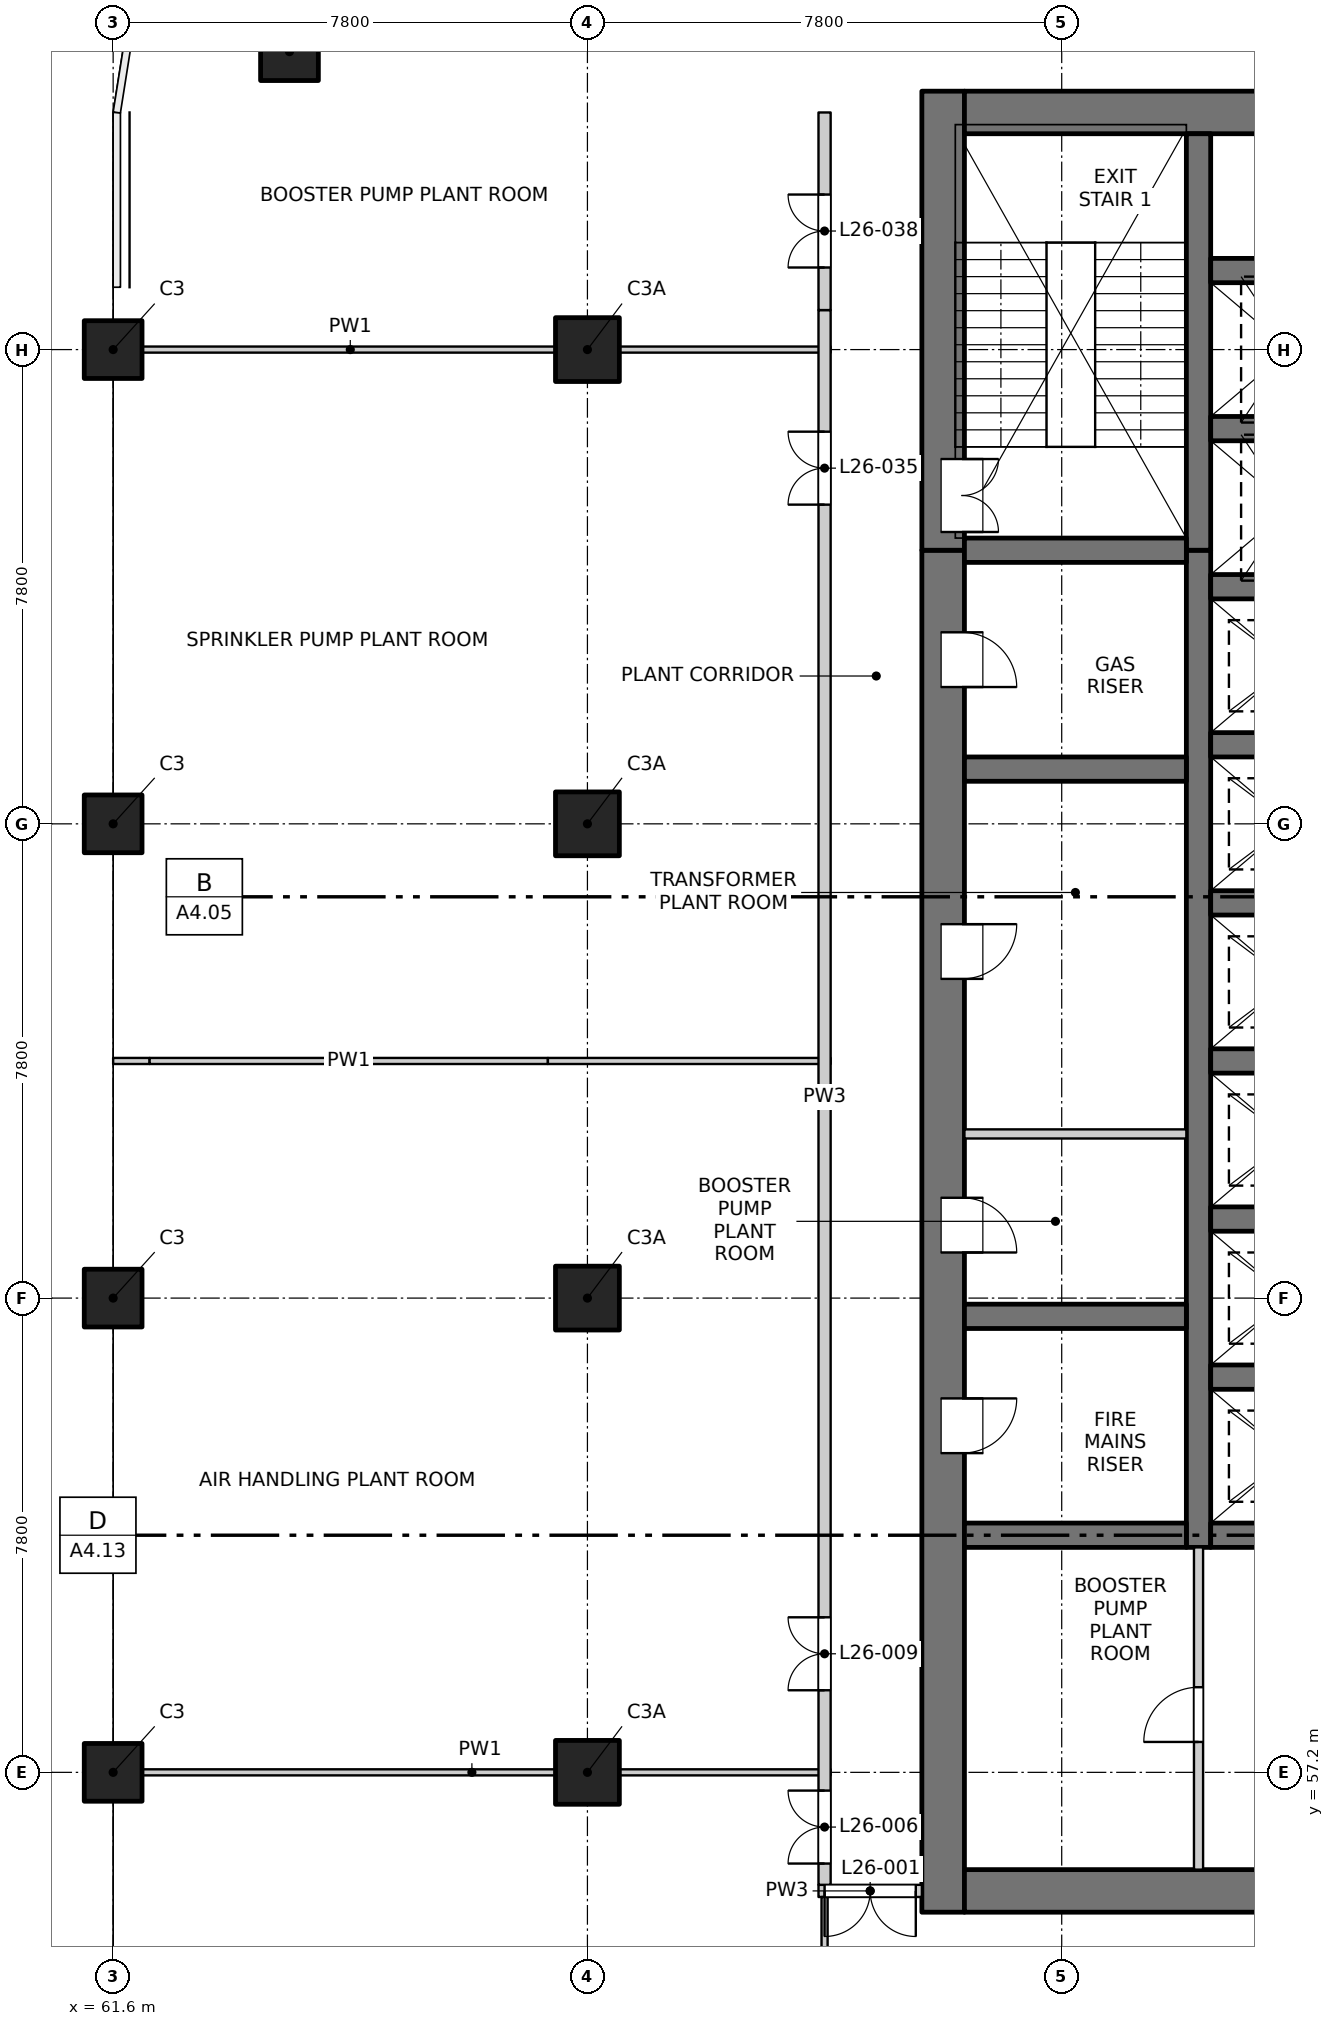
"""IFC4 building model, lengths in metres.
Left out: names, types, materials, properties, quantities, classifications, styles, units other than length and angle.
Written with IfcOpenShell. Run it as: python <this file> out.ifc"""

import sys

from ifc_helpers import new_model, si_unit, direction, frame, frame_2d, origin, origin_2d, place, context, subcontext, project, spatial, rectangle, extrude, element, fill, save


model = new_model("IFC4")
c1 = context("Model", 3, precision=1e-05, world=origin(), true_north=direction((0.0, 1.0)))
c2 = subcontext(c1, "Body", "Model", "MODEL_VIEW")
j1 = project(units=[si_unit("LENGTHUNIT", "METRE"), si_unit("PLANEANGLEUNIT", "RADIAN")], contexts=[c1])
p1 = place(None, origin())
s1 = spatial("IfcSite", under=j1, at=p1, CompositionType="ELEMENT")
p2 = place(p1, origin())
s2 = spatial("IfcBuilding", under=s1, at=p2, CompositionType="ELEMENT")
p3 = place(p2, frame((0.0, 0.0, 95.4)))
s3 = spatial("IfcBuildingStorey", under=s2, at=p3, CompositionType="ELEMENT", Elevation=95.4)
for number, where, z_axis, x_axis in (
    (1, (64.5, 85.5, -0.3), (0.0, 0.0, 1.0), (1.0, 0.0, 0.0)),
    (2, (61.6, 57.2, -0.3), (0.0, 0.0, 1.0), (1.0, 0.0, 0.0)),
    (3, (61.6, 65.0, -0.3), (0.0, 0.0, 1.0), (1.0, 0.0, 0.0)),
    (4, (61.6, 72.8, -0.3), (0.0, 0.0, 1.0), (1.0, 0.0, 0.0)),
    (5, (61.6, 80.6, -0.3), (0.0, 0.0, 1.0), (1.0, 0.0, 0.0)),
):
    element("IfcColumn", number, at=place(p3, frame(where, z_axis=z_axis, x_axis=x_axis)), inside=s3, PredefinedType="COLUMN", context=c2, shape_type="SweptSolid", body=[
        extrude(rectangle(XDim=0.95, YDim=0.95, at=origin_2d()), origin(), (0.0, 0.0, 1.0), 2.9),
    ])
for number, where, z_axis, x_axis in (
    (6, (69.4, 57.2, -0.3), (0.0, 0.0, 1.0), (1.0, 0.0, 0.0)),
    (7, (69.4, 65.0, -0.3), (0.0, 0.0, 1.0), (1.0, 0.0, 0.0)),
    (8, (69.4, 72.8, -0.3), (0.0, 0.0, 1.0), (1.0, 0.0, 0.0)),
    (9, (69.4, 80.6, -0.3), (0.0, 0.0, 1.0), (1.0, 0.0, 0.0)),
):
    element("IfcColumn", number, at=place(p3, frame(where, z_axis=z_axis, x_axis=x_axis)), inside=s3, PredefinedType="COLUMN", context=c2, shape_type="SweptSolid", body=[
        extrude(rectangle(XDim=1.05, YDim=1.05, at=origin_2d()), origin(), (0.0, 0.0, 1.0), 2.9),
    ])
p4 = place(p3, frame((75.25, 54.9, -0.3), z_axis=(0.0, 0.0, 1.0), x_axis=(0.0, 1.0, 0.0)))
e10 = element("IfcWall", 10, at=p4, inside=s3, PredefinedType="SOLIDWALL", context=c2, shape_type="SweptSolid", body=[
    extrude(rectangle(XDim=22.4, YDim=0.7, at=frame_2d((11.2, 0.0))), origin(), (0.0, 0.0, 1.0), 4.5),
])
p5 = place(p4, frame((7.55, 0.0, 0.3)))
e11 = element("IfcOpeningElement", 11, at=p5, cuts=e10, PredefinedType="OPENING", context=c2, shape_type="SweptSolid", body=[
    extrude(rectangle(XDim=0.9, YDim=2.1, at=frame_2d((0.45, 1.05))), frame((0.0, 0.36, 0.0), z_axis=(0.0, -1.0, 0.0), x_axis=(1.0, 0.0, 0.0)), (0.0, 0.0, 1.0), 0.72),
])
p6 = place(p4, frame((10.85, 0.0, 0.3)))
e12 = element("IfcOpeningElement", 12, at=p6, cuts=e10, PredefinedType="OPENING", context=c2, shape_type="SweptSolid", body=[
    extrude(rectangle(XDim=0.9, YDim=2.1, at=frame_2d((0.45, 1.05))), frame((0.0, 0.36, 0.0), z_axis=(0.0, -1.0, 0.0), x_axis=(1.0, 0.0, 0.0)), (0.0, 0.0, 1.0), 0.72),
])
p7 = place(p4, frame((15.35, 0.0, 0.3)))
e13 = element("IfcOpeningElement", 13, at=p7, cuts=e10, PredefinedType="OPENING", context=c2, shape_type="SweptSolid", body=[
    extrude(rectangle(XDim=0.9, YDim=2.1, at=frame_2d((0.45, 1.05))), frame((0.0, 0.36, 0.0), z_axis=(0.0, -1.0, 0.0), x_axis=(1.0, 0.0, 0.0)), (0.0, 0.0, 1.0), 0.72),
])
p8 = place(p4, frame((20.15, 0.0, 0.3)))
e14 = element("IfcOpeningElement", 14, at=p8, cuts=e10, PredefinedType="OPENING", context=c2, shape_type="SweptSolid", body=[
    extrude(rectangle(XDim=0.9, YDim=2.1, at=frame_2d((0.45, 1.05))), frame((0.0, 0.36, 0.0), z_axis=(0.0, -1.0, 0.0), x_axis=(1.0, 0.0, 0.0)), (0.0, 0.0, 1.0), 0.72),
])
p9 = place(p3, frame((75.25, 77.3, -0.3), z_axis=(0.0, 0.0, 1.0), x_axis=(0.0, 1.0, 0.0)))
e15 = element("IfcWall", 15, at=p9, inside=s3, PredefinedType="SOLIDWALL", context=c2, shape_type="SweptSolid", body=[
    extrude(rectangle(XDim=7.55, YDim=0.7, at=frame_2d((3.775, 0.0))), origin(), (0.0, 0.0, 1.0), 4.5),
])
p10 = place(p9, frame((0.3, 0.0, 0.3)))
e16 = element("IfcOpeningElement", 16, at=p10, cuts=e15, PredefinedType="OPENING", context=c2, shape_type="SweptSolid", body=[
    extrude(rectangle(XDim=1.2, YDim=2.1, at=frame_2d((0.6, 1.05))), frame((0.0, 0.36, 0.0), z_axis=(0.0, -1.0, 0.0), x_axis=(1.0, 0.0, 0.0)), (0.0, 0.0, 1.0), 0.72),
])
p11 = place(p3, frame((75.6, 55.25, -0.3), z_axis=(0.0, 0.0, 1.0), x_axis=(1.0, 0.0, 0.0)))
e17 = element("IfcWall", 17, at=p11, inside=s3, PredefinedType="SOLIDWALL", context=c2, shape_type="SweptSolid", body=[
    extrude(rectangle(XDim=18.8, YDim=0.7, at=frame_2d((9.4, 0.0))), origin(), (0.0, 0.0, 1.0), 4.5),
])
p12 = place(p11, frame((7.15, 0.0, 0.3)))
e18 = element("IfcOpeningElement", 18, at=p12, cuts=e17, PredefinedType="OPENING", context=c2, shape_type="SweptSolid", body=[
    extrude(rectangle(XDim=1.5, YDim=2.1, at=frame_2d((0.75, 1.05))), frame((0.0, 0.36, 0.0), z_axis=(0.0, -1.0, 0.0), x_axis=(1.0, 0.0, 0.0)), (0.0, 0.0, 1.0), 0.72),
])
p13 = place(p3, frame((75.6, 84.5, -0.3), z_axis=(0.0, 0.0, 1.0), x_axis=(1.0, 0.0, 0.0)))
e19 = element("IfcWall", 19, at=p13, inside=s3, PredefinedType="SOLIDWALL", context=c2, shape_type="SweptSolid", body=[
    extrude(rectangle(XDim=18.8, YDim=0.7, at=frame_2d((9.4, 0.0))), origin(), (0.0, 0.0, 1.0), 4.5),
])
p14 = place(p3, frame((79.45, 60.9, -0.3), z_axis=(0.0, 0.0, 1.0), x_axis=(0.0, 1.0, 0.0)))
e20 = element("IfcWall", 20, at=p14, inside=s3, PredefinedType="SOLIDWALL", context=c2, shape_type="SweptSolid", body=[
    extrude(rectangle(XDim=16.4, YDim=0.4, at=frame_2d((8.2, 0.0))), origin(), (0.0, 0.0, 1.0), 4.5),
])
p15 = place(p3, frame((79.45, 77.3, -0.3), z_axis=(0.0, 0.0, 1.0), x_axis=(0.0, 1.0, 0.0)))
e21 = element("IfcWall", 21, at=p15, inside=s3, PredefinedType="SOLIDWALL", context=c2, shape_type="SweptSolid", body=[
    extrude(rectangle(XDim=6.85, YDim=0.4, at=frame_2d((3.425, 0.0))), origin(), (0.0, 0.0, 1.0), 4.5),
])
for number, where, z_axis, x_axis in (
    (22, (79.65, 61.1, -0.3), (0.0, 0.0, 1.0), (1.0, 0.0, 0.0)),
    (23, (79.65, 63.7, -0.3), (0.0, 0.0, 1.0), (1.0, 0.0, 0.0)),
    (24, (79.65, 66.3, -0.3), (0.0, 0.0, 1.0), (1.0, 0.0, 0.0)),
    (25, (79.65, 68.9, -0.3), (0.0, 0.0, 1.0), (1.0, 0.0, 0.0)),
    (26, (79.65, 71.5, -0.3), (0.0, 0.0, 1.0), (1.0, 0.0, 0.0)),
    (27, (79.65, 74.1, -0.3), (0.0, 0.0, 1.0), (1.0, 0.0, 0.0)),
    (28, (79.65, 76.7, -0.3), (0.0, 0.0, 1.0), (1.0, 0.0, 0.0)),
    (29, (79.65, 79.3, -0.3), (0.0, 0.0, 1.0), (1.0, 0.0, 0.0)),
    (30, (79.65, 81.9, -0.3), (0.0, 0.0, 1.0), (1.0, 0.0, 0.0)),
):
    element("IfcWall", number, at=place(p3, frame(where, z_axis=z_axis, x_axis=x_axis)), inside=s3, PredefinedType="SOLIDWALL", context=c2, shape_type="SweptSolid", body=[
        extrude(rectangle(XDim=3.0, YDim=0.4, at=frame_2d((1.5, 0.0))), origin(), (0.0, 0.0, 1.0), 4.5),
    ])
for number, where, z_axis, x_axis in (
    (31, (75.6, 61.1, -0.3), (0.0, 0.0, 1.0), (1.0, 0.0, 0.0)),
    (32, (75.6, 64.7, -0.3), (0.0, 0.0, 1.0), (1.0, 0.0, 0.0)),
    (33, (75.6, 73.7, -0.3), (0.0, 0.0, 1.0), (1.0, 0.0, 0.0)),
    (34, (75.6, 77.3, -0.3), (0.0, 0.0, 1.0), (1.0, 0.0, 0.0)),
):
    element("IfcWall", number, at=place(p3, frame(where, z_axis=z_axis, x_axis=x_axis)), inside=s3, PredefinedType="SOLIDWALL", context=c2, shape_type="SweptSolid", body=[
        extrude(rectangle(XDim=3.65, YDim=0.4, at=frame_2d((1.825, 0.0))), origin(), (0.0, 0.0, 1.0), 4.5),
    ])
p16 = place(p3, frame((73.2, 55.25, 0.0), z_axis=(0.0, 0.0, 1.0), x_axis=(1.0, 0.0, 0.0)))
e35 = element("IfcWall", 35, at=p16, inside=s3, PredefinedType="PARTITIONING", context=c2, shape_type="SweptSolid", body=[
    extrude(rectangle(XDim=1.7, YDim=0.2, at=frame_2d((0.85, 0.0))), origin(), (0.0, 0.0, 1.0), 4.2),
])
p17 = place(p16, frame((0.1, 0.0, 0.0)))
e36 = element("IfcOpeningElement", 36, at=p17, cuts=e35, PredefinedType="OPENING", context=c2, shape_type="SweptSolid", body=[
    extrude(rectangle(XDim=1.5, YDim=2.1, at=frame_2d((0.75, 1.05))), frame((0.0, 0.11, 0.0), z_axis=(0.0, -1.0, 0.0), x_axis=(1.0, 0.0, 0.0)), (0.0, 0.0, 1.0), 0.22),
])
p18 = place(p3, frame((61.6, 57.2, 0.0), z_axis=(0.0, 0.0, 1.0), x_axis=(1.0, 0.0, 0.0)))
e37 = element("IfcWall", 37, at=p18, inside=s3, PredefinedType="PARTITIONING", context=c2, shape_type="SweptSolid", body=[
    extrude(rectangle(XDim=11.8, YDim=0.1, at=frame_2d((5.9, 0.0))), origin(), (0.0, 0.0, 1.0), 4.2),
])
p19 = place(p3, frame((75.6, 67.7, 0.0), z_axis=(0.0, 0.0, 1.0), x_axis=(1.0, 0.0, 0.0)))
e38 = element("IfcWall", 38, at=p19, inside=s3, PredefinedType="PARTITIONING", context=c2, shape_type="SweptSolid", body=[
    extrude(rectangle(XDim=3.65, YDim=0.15, at=frame_2d((1.825, 0.0))), origin(), (0.0, 0.0, 1.0), 4.2),
])
p20 = place(p3, frame((61.6, 68.9, 0.0), z_axis=(0.0, 0.0, 1.0), x_axis=(1.0, 0.0, 0.0)))
e39 = element("IfcWall", 39, at=p20, inside=s3, PredefinedType="PARTITIONING", context=c2, shape_type="SweptSolid", body=[
    extrude(rectangle(XDim=0.6, YDim=0.1, at=frame_2d((0.3, 0.0))), origin(), (0.0, 0.0, 1.0), 4.2),
])
p21 = place(p3, frame((62.2, 68.9, 0.0), z_axis=(0.0, 0.0, 1.0), x_axis=(1.0, 0.0, 0.0)))
e40 = element("IfcWall", 40, at=p21, inside=s3, PredefinedType="PARTITIONING", context=c2, shape_type="SweptSolid", body=[
    extrude(rectangle(XDim=6.55, YDim=0.1, at=frame_2d((3.275, 0.0))), origin(), (0.0, 0.0, 1.0), 2.6),
])
p22 = place(p3, frame((68.75, 68.9, 0.0), z_axis=(0.0, 0.0, 1.0), x_axis=(1.0, 0.0, 0.0)))
e41 = element("IfcWall", 41, at=p22, inside=s3, PredefinedType="PARTITIONING", context=c2, shape_type="SweptSolid", body=[
    extrude(rectangle(XDim=4.65, YDim=0.1, at=frame_2d((2.325, 0.0))), origin(), (0.0, 0.0, 1.0), 3.6),
])
p23 = place(p3, frame((61.6, 80.6, 0.0), z_axis=(0.0, 0.0, 1.0), x_axis=(1.0, 0.0, 0.0)))
e42 = element("IfcWall", 42, at=p23, inside=s3, PredefinedType="PARTITIONING", context=c2, shape_type="SweptSolid", body=[
    extrude(rectangle(XDim=7.8, YDim=0.1, at=frame_2d((3.9, 0.0))), origin(), (0.0, 0.0, 1.0), 4.2),
])
p24 = place(p3, frame((69.4, 80.6, 0.0), z_axis=(0.0, 0.0, 1.0), x_axis=(1.0, 0.0, 0.0)))
e43 = element("IfcWall", 43, at=p24, inside=s3, PredefinedType="PARTITIONING", context=c2, shape_type="SweptSolid", body=[
    extrude(rectangle(XDim=4.0, YDim=0.1, at=frame_2d((2.0, 0.0))), origin(), (0.0, 0.0, 1.0), 2.6),
])
p25 = place(p3, frame((73.3, 48.75, 0.0), z_axis=(0.0, 0.0, 1.0), x_axis=(0.0, 1.0, 0.0)))
e44 = element("IfcWall", 44, at=p25, inside=s3, PredefinedType="PARTITIONING", context=c2, shape_type="SweptSolid", body=[
    extrude(rectangle(XDim=6.4, YDim=0.1, at=frame_2d((3.2, 0.0))), origin(), (0.0, 0.0, 1.0), 4.2),
])
p26 = place(p3, frame((73.3, 55.35, 0.0), z_axis=(0.0, 0.0, 1.0), x_axis=(0.0, 1.0, 0.0)))
e45 = element("IfcWall", 45, at=p26, inside=s3, PredefinedType="PARTITIONING", context=c2, shape_type="SweptSolid", body=[
    extrude(rectangle(XDim=25.9, YDim=0.2, at=frame_2d((12.95, 0.0))), origin(), (0.0, 0.0, 1.0), 4.2),
])
p27 = place(p26, frame((0.35, 0.0, 0.0)))
e46 = element("IfcOpeningElement", 46, at=p27, cuts=e45, PredefinedType="OPENING", context=c2, shape_type="SweptSolid", body=[
    extrude(rectangle(XDim=1.2, YDim=2.1, at=frame_2d((0.6, 1.05))), frame((0.0, 0.11, 0.0), z_axis=(0.0, -1.0, 0.0), x_axis=(1.0, 0.0, 0.0)), (0.0, 0.0, 1.0), 0.22),
])
p28 = place(p26, frame((3.2, 0.0, 0.0)))
e47 = element("IfcOpeningElement", 47, at=p28, cuts=e45, PredefinedType="OPENING", context=c2, shape_type="SweptSolid", body=[
    extrude(rectangle(XDim=1.2, YDim=2.1, at=frame_2d((0.6, 1.05))), frame((0.0, 0.11, 0.0), z_axis=(0.0, -1.0, 0.0), x_axis=(1.0, 0.0, 0.0)), (0.0, 0.0, 1.0), 0.22),
])
p29 = place(p26, frame((22.7, 0.0, 0.0)))
e48 = element("IfcOpeningElement", 48, at=p29, cuts=e45, PredefinedType="OPENING", context=c2, shape_type="SweptSolid", body=[
    extrude(rectangle(XDim=1.2, YDim=2.1, at=frame_2d((0.6, 1.05))), frame((0.0, 0.11, 0.0), z_axis=(0.0, -1.0, 0.0), x_axis=(1.0, 0.0, 0.0)), (0.0, 0.0, 1.0), 0.22),
])
p30 = place(p3, frame((73.3, 81.25, 0.0), z_axis=(0.0, 0.0, 1.0), x_axis=(0.0, 1.0, 0.0)))
e49 = element("IfcWall", 49, at=p30, inside=s3, PredefinedType="PARTITIONING", context=c2, shape_type="SweptSolid", body=[
    extrude(rectangle(XDim=3.25, YDim=0.2, at=frame_2d((1.625, 0.0))), origin(), (0.0, 0.0, 1.0), 2.6),
])
p31 = place(p30, frame((0.7, 0.0, 0.0)))
e50 = element("IfcOpeningElement", 50, at=p31, cuts=e49, PredefinedType="OPENING", context=c2, shape_type="SweptSolid", body=[
    extrude(rectangle(XDim=1.2, YDim=2.1, at=frame_2d((0.6, 1.05))), frame((0.0, 0.11, 0.0), z_axis=(0.0, -1.0, 0.0), x_axis=(1.0, 0.0, 0.0)), (0.0, 0.0, 1.0), 0.22),
])
p32 = place(p3, frame((79.45, 55.6, 0.0), z_axis=(0.0, 0.0, 1.0), x_axis=(0.0, 1.0, 0.0)))
e51 = element("IfcWall", 51, at=p32, inside=s3, PredefinedType="PARTITIONING", context=c2, shape_type="SweptSolid", body=[
    extrude(rectangle(XDim=5.3, YDim=0.15, at=frame_2d((2.65, 0.0))), origin(), (0.0, 0.0, 1.0), 4.2),
])
p33 = place(p32, frame((2.1, 0.0, 0.0)))
e52 = element("IfcOpeningElement", 52, at=p33, cuts=e51, PredefinedType="OPENING", context=c2, shape_type="SweptSolid", body=[
    extrude(rectangle(XDim=0.9, YDim=2.1, at=frame_2d((0.45, 1.05))), frame((0.0, 0.085, 0.0), z_axis=(0.0, -1.0, 0.0), x_axis=(1.0, 0.0, 0.0)), (0.0, 0.0, 1.0), 0.17),
])
p34 = place(p17, origin())
e53 = element("IfcDoor", 53, at=p34, inside=s3, OperationType="DOUBLE_DOOR_SINGLE_SWING", PredefinedType="DOOR", context=c2, shape_type="SweptSolid", body=[
    extrude(rectangle(XDim=1.5, YDim=2.1, at=frame_2d((0.75, 1.05))), frame((0.0, 0.025, 0.0), z_axis=(0.0, -1.0, 0.0), x_axis=(1.0, 0.0, 0.0)), (0.0, 0.0, 1.0), 0.05),
])
fill(e36, e53)
p35 = place(p27, origin())
e54 = element("IfcDoor", 54, at=p35, inside=s3, OperationType="DOUBLE_DOOR_SINGLE_SWING", PredefinedType="DOOR", context=c2, shape_type="SweptSolid", body=[
    extrude(rectangle(XDim=1.2, YDim=2.1, at=frame_2d((0.6, 1.05))), frame((0.0, 0.025, 0.0), z_axis=(0.0, -1.0, 0.0), x_axis=(1.0, 0.0, 0.0)), (0.0, 0.0, 1.0), 0.05),
])
fill(e46, e54)
p36 = place(p33, origin())
e55 = element("IfcDoor", 55, at=p36, inside=s3, OperationType="SINGLE_SWING_LEFT", PredefinedType="DOOR", context=c2, shape_type="SweptSolid", body=[
    extrude(rectangle(XDim=0.9, YDim=2.1, at=frame_2d((0.45, 1.05))), frame((0.0, 0.025, 0.0), z_axis=(0.0, -1.0, 0.0), x_axis=(1.0, 0.0, 0.0)), (0.0, 0.0, 1.0), 0.05),
])
fill(e52, e55)
p37 = place(p28, origin())
e56 = element("IfcDoor", 56, at=p37, inside=s3, OperationType="DOUBLE_DOOR_SINGLE_SWING", PredefinedType="DOOR", context=c2, shape_type="SweptSolid", body=[
    extrude(rectangle(XDim=1.2, YDim=2.1, at=frame_2d((0.6, 1.05))), frame((0.0, 0.025, 0.0), z_axis=(0.0, -1.0, 0.0), x_axis=(1.0, 0.0, 0.0)), (0.0, 0.0, 1.0), 0.05),
])
fill(e47, e56)
p38 = place(p5, origin())
e57 = element("IfcDoor", 57, at=p38, inside=s3, OperationType="SINGLE_SWING_LEFT", PredefinedType="DOOR", context=c2, shape_type="SweptSolid", body=[
    extrude(rectangle(XDim=0.9, YDim=2.1, at=frame_2d((0.45, 1.05))), frame((0.0, -0.285, 0.0), z_axis=(0.0, -1.0, 0.0), x_axis=(1.0, 0.0, 0.0)), (0.0, 0.0, 1.0), 0.05),
])
fill(e11, e57)
p39 = place(p6, origin())
e58 = element("IfcDoor", 58, at=p39, inside=s3, OperationType="SINGLE_SWING_RIGHT", PredefinedType="DOOR", context=c2, shape_type="SweptSolid", body=[
    extrude(rectangle(XDim=0.9, YDim=2.1, at=frame_2d((0.45, 1.05))), frame((0.0, -0.285, 0.0), z_axis=(0.0, -1.0, 0.0), x_axis=(1.0, 0.0, 0.0)), (0.0, 0.0, 1.0), 0.05),
])
fill(e12, e58)
p40 = place(p7, origin())
e59 = element("IfcDoor", 59, at=p40, inside=s3, OperationType="SINGLE_SWING_LEFT", PredefinedType="DOOR", context=c2, shape_type="SweptSolid", body=[
    extrude(rectangle(XDim=0.9, YDim=2.1, at=frame_2d((0.45, 1.05))), frame((0.0, -0.285, 0.0), z_axis=(0.0, -1.0, 0.0), x_axis=(1.0, 0.0, 0.0)), (0.0, 0.0, 1.0), 0.05),
])
fill(e13, e59)
p41 = place(p8, origin())
e60 = element("IfcDoor", 60, at=p41, inside=s3, OperationType="SINGLE_SWING_RIGHT", PredefinedType="DOOR", context=c2, shape_type="SweptSolid", body=[
    extrude(rectangle(XDim=0.9, YDim=2.1, at=frame_2d((0.45, 1.05))), frame((0.0, -0.285, 0.0), z_axis=(0.0, -1.0, 0.0), x_axis=(1.0, 0.0, 0.0)), (0.0, 0.0, 1.0), 0.05),
])
fill(e14, e60)
p42 = place(p10, origin())
e61 = element("IfcDoor", 61, at=p42, inside=s3, OperationType="DOUBLE_DOOR_SINGLE_SWING", PredefinedType="DOOR", context=c2, shape_type="SweptSolid", body=[
    extrude(rectangle(XDim=1.2, YDim=2.1, at=frame_2d((0.6, 1.05))), frame((0.0, -0.285, 0.0), z_axis=(0.0, -1.0, 0.0), x_axis=(1.0, 0.0, 0.0)), (0.0, 0.0, 1.0), 0.05),
])
fill(e16, e61)
p43 = place(p29, origin())
e62 = element("IfcDoor", 62, at=p43, inside=s3, OperationType="DOUBLE_DOOR_SINGLE_SWING", PredefinedType="DOOR", context=c2, shape_type="SweptSolid", body=[
    extrude(rectangle(XDim=1.2, YDim=2.1, at=frame_2d((0.6, 1.05))), frame((0.0, 0.025, 0.0), z_axis=(0.0, -1.0, 0.0), x_axis=(1.0, 0.0, 0.0)), (0.0, 0.0, 1.0), 0.05),
])
fill(e48, e62)
p44 = place(p31, origin())
e63 = element("IfcDoor", 63, at=p44, inside=s3, OperationType="DOUBLE_DOOR_SINGLE_SWING", PredefinedType="DOOR", context=c2, shape_type="SweptSolid", body=[
    extrude(rectangle(XDim=1.2, YDim=2.1, at=frame_2d((0.6, 1.05))), frame((0.0, 0.025, 0.0), z_axis=(0.0, -1.0, 0.0), x_axis=(1.0, 0.0, 0.0)), (0.0, 0.0, 1.0), 0.05),
])
fill(e50, e63)
save(model, sys.argv[1])
